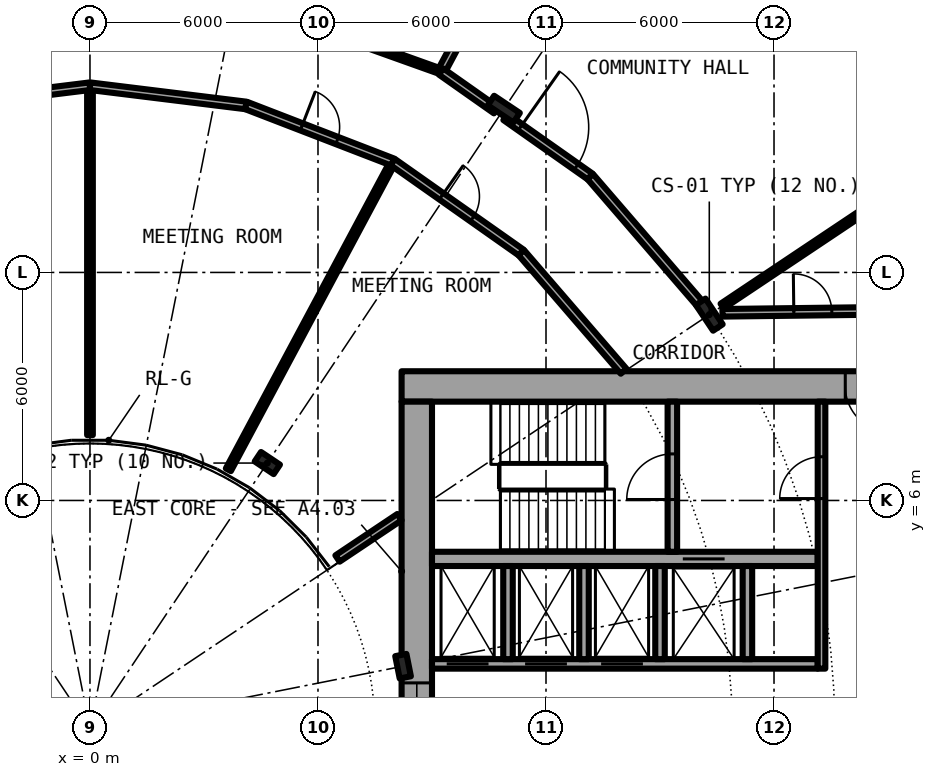
"""IFC4 building model, lengths in metres.
Left out: names, types, materials, properties, quantities, classifications, styles, units other than length and angle.
Written with IfcOpenShell. Run it as: python <this file> out.ifc"""

import sys

from ifc_helpers import new_model, si_unit, direction, frame, frame_2d, origin, origin_2d, place, context, subcontext, project, spatial, rectangle, i_section, extrude, element, fill, save


model = new_model("IFC4")
c1 = context("Model", 3, precision=1e-05, world=origin(), true_north=direction((0.0, 1.0)))
c2 = subcontext(c1, "Body", "Model", "MODEL_VIEW")
j1 = project(units=[si_unit("LENGTHUNIT", "METRE"), si_unit("PLANEANGLEUNIT", "RADIAN")], contexts=[c1])
p1 = place(None, origin())
s1 = spatial("IfcSite", under=j1, at=p1, CompositionType="ELEMENT")
p2 = place(p1, origin())
s2 = spatial("IfcBuilding", under=s1, at=p2, CompositionType="ELEMENT")
p3 = place(p2, frame((0.0, 0.0, 9.6)))
s3 = spatial("IfcBuildingStorey", under=s2, at=p3, CompositionType="ELEMENT", Elevation=9.6)
for number, where, z_axis, x_axis in (
    (1, (16.297, 10.889, 0.0), (0.0, 0.0, 1.0), (0.831, 0.556, 0.0)),
    (2, (10.889, 16.297, 0.0), (0.0, 0.0, 1.0), (0.556, 0.831, 0.0)),
):
    element("IfcColumn", number, at=place(p3, frame(where, z_axis=z_axis, x_axis=x_axis)), inside=s3, PredefinedType="COLUMN", context=c2, shape_type="SweptSolid", body=[
        extrude(i_section(OverallWidth=0.303, OverallDepth=0.814, WebThickness=0.021, FlangeThickness=0.04, FilletRadius=0.03, at=origin_2d()), origin(), (0.0, 0.0, 1.0), 4.5),
    ])
for number, where, z_axis, x_axis in (
    (3, (8.239, 1.639, 0.0), (0.0, 0.0, 1.0), (0.981, 0.195, 0.0)),
    (4, (4.667, 6.984, 0.0), (0.0, 0.0, 1.0), (0.556, 0.831, 0.0)),
):
    element("IfcColumn", number, at=place(p3, frame(where, z_axis=z_axis, x_axis=x_axis)), inside=s3, PredefinedType="COLUMN", context=c2, shape_type="SweptSolid", body=[
        extrude(i_section(OverallWidth=0.3, OverallDepth=0.6, WebThickness=0.015, FlangeThickness=0.03, FilletRadius=0.027, at=origin_2d()), origin(), (0.0, 0.0, 1.0), 4.5),
    ])
p4 = place(p3, frame((22.4, 9.0, 0.0), z_axis=(0.0, 0.0, 1.0), x_axis=(-1.0, 0.0, 0.0)))
e5 = element("IfcWall", 5, at=p4, inside=s3, PredefinedType="SHEAR", context=c2, shape_type="SweptSolid", body=[
    extrude(rectangle(XDim=14.2, YDim=0.8, at=frame_2d((7.1, 0.0))), origin(), (0.0, 0.0, 1.0), 4.5),
])
p5 = place(p4, frame((1.325, 0.0, 0.0)))
e6 = element("IfcOpeningElement", 6, at=p5, cuts=e5, PredefinedType="OPENING", context=c2, shape_type="SweptSolid", body=[
    extrude(rectangle(XDim=1.2, YDim=2.3, at=frame_2d((0.6, 1.15))), frame((0.0, 0.41, 0.0), z_axis=(0.0, -1.0, 0.0), x_axis=(1.0, 0.0, 0.0)), (0.0, 0.0, 1.0), 0.82),
])
p6 = place(p3, frame((8.6, -8.6, 0.0), z_axis=(0.0, 0.0, 1.0), x_axis=(0.0, 1.0, 0.0)))
e7 = element("IfcWall", 7, at=p6, inside=s3, PredefinedType="SHEAR", context=c2, shape_type="SweptSolid", body=[
    extrude(rectangle(XDim=17.2, YDim=0.8, at=frame_2d((8.6, 0.0))), origin(), (0.0, 0.0, 1.0), 4.5),
])
p7 = place(p6, frame((7.4, 0.0, 0.1)))
e8 = element("IfcOpeningElement", 8, at=p7, cuts=e7, PredefinedType="OPENING", context=c2, shape_type="SweptSolid", body=[
    extrude(rectangle(XDim=2.4, YDim=2.2, at=frame_2d((1.2, 1.1))), frame((0.0, 0.41, 0.0), z_axis=(0.0, -1.0, 0.0), x_axis=(1.0, 0.0, 0.0)), (0.0, 0.0, 1.0), 0.82),
])
p8 = place(p3, frame((9.0, 1.7, 0.0), z_axis=(0.0, 0.0, 1.0), x_axis=(1.0, 0.0, 0.0)))
e9 = element("IfcWall", 9, at=p8, inside=s3, PredefinedType="SHEAR", context=c2, shape_type="SweptSolid", body=[
    extrude(rectangle(XDim=10.15, YDim=0.25, at=frame_2d((5.075, 0.0))), origin(), (0.0, 0.0, 1.0), 4.5),
])
p9 = place(p8, frame((0.387, 0.0, 0.0)))
e10 = element("IfcOpeningElement", 10, at=p9, cuts=e9, PredefinedType="OPENING", context=c2, shape_type="SweptSolid", body=[
    extrude(rectangle(XDim=1.1, YDim=2.3, at=frame_2d((0.55, 1.15))), frame((0.0, 0.135, 0.0), z_axis=(0.0, -1.0, 0.0), x_axis=(1.0, 0.0, 0.0)), (0.0, 0.0, 1.0), 0.27),
])
p10 = place(p8, frame((2.45, 0.0, 0.0)))
e11 = element("IfcOpeningElement", 11, at=p10, cuts=e9, PredefinedType="OPENING", context=c2, shape_type="SweptSolid", body=[
    extrude(rectangle(XDim=1.1, YDim=2.3, at=frame_2d((0.55, 1.15))), frame((0.0, 0.135, 0.0), z_axis=(0.0, -1.0, 0.0), x_axis=(1.0, 0.0, 0.0)), (0.0, 0.0, 1.0), 0.27),
])
p11 = place(p8, frame((4.45, 0.0, 0.0)))
e12 = element("IfcOpeningElement", 12, at=p11, cuts=e9, PredefinedType="OPENING", context=c2, shape_type="SweptSolid", body=[
    extrude(rectangle(XDim=1.1, YDim=2.3, at=frame_2d((0.55, 1.15))), frame((0.0, 0.135, 0.0), z_axis=(0.0, -1.0, 0.0), x_axis=(1.0, 0.0, 0.0)), (0.0, 0.0, 1.0), 0.27),
])
p12 = place(p3, frame((9.0, 4.462, 0.0), z_axis=(0.0, 0.0, 1.0), x_axis=(1.0, 0.0, 0.0)))
e13 = element("IfcWall", 13, at=p12, inside=s3, PredefinedType="SHEAR", context=c2, shape_type="SweptSolid", body=[
    extrude(rectangle(XDim=10.15, YDim=0.375, at=frame_2d((5.075, 0.0))), origin(), (0.0, 0.0, 1.0), 4.5),
])
p13 = place(p12, frame((6.6, 0.0, 0.0)))
e14 = element("IfcOpeningElement", 14, at=p13, cuts=e13, PredefinedType="OPENING", context=c2, shape_type="SweptSolid", body=[
    extrude(rectangle(XDim=1.1, YDim=2.3, at=frame_2d((0.55, 1.15))), frame((0.0, 0.198, 0.0), z_axis=(0.0, -1.0, 0.0), x_axis=(1.0, 0.0, 0.0)), (0.0, 0.0, 1.0), 0.395),
])
p14 = place(p3, frame((15.325, 4.65, 0.0), z_axis=(0.0, 0.0, 1.0), x_axis=(0.0, 1.0, 0.0)))
e15 = element("IfcWall", 15, at=p14, inside=s3, PredefinedType="SHEAR", context=c2, shape_type="SweptSolid", body=[
    extrude(rectangle(XDim=3.95, YDim=0.25, at=frame_2d((1.975, 0.0))), origin(), (0.0, 0.0, 1.0), 4.5),
])
p15 = place(p14, frame((1.375, 0.0, 0.0)))
e16 = element("IfcOpeningElement", 16, at=p15, cuts=e15, PredefinedType="OPENING", context=c2, shape_type="SweptSolid", body=[
    extrude(rectangle(XDim=1.2, YDim=2.3, at=frame_2d((0.6, 1.15))), frame((0.0, 0.135, 0.0), z_axis=(0.0, -1.0, 0.0), x_axis=(1.0, 0.0, 0.0)), (0.0, 0.0, 1.0), 0.27),
])
for number, where, z_axis, x_axis in (
    (17, (15.0, 1.825, 0.0), (0.0, 0.0, 1.0), (0.0, 1.0, 0.0)),
    (18, (17.3, 1.825, 0.0), (0.0, 0.0, 1.0), (0.0, 1.0, 0.0)),
):
    element("IfcWall", number, at=place(p3, frame(where, z_axis=z_axis, x_axis=x_axis)), inside=s3, PredefinedType="SOLIDWALL", context=c2, shape_type="SweptSolid", body=[
        extrude(rectangle(XDim=2.45, YDim=0.25, at=frame_2d((1.225, 0.0))), origin(), (0.0, 0.0, 1.0), 4.05),
    ])
p16 = place(p3, frame((19.25, 1.575, 0.0), z_axis=(0.0, 0.0, 1.0), x_axis=(0.0, 1.0, 0.0)))
e19 = element("IfcWall", 19, at=p16, inside=s3, PredefinedType="SOLIDWALL", context=c2, shape_type="SweptSolid", body=[
    extrude(rectangle(XDim=7.025, YDim=0.2, at=frame_2d((3.513, 0.0))), origin(), (0.0, 0.0, 1.0), 4.05),
])
p17 = place(p16, frame((4.475, 0.0, 0.0)))
e20 = element("IfcOpeningElement", 20, at=p17, cuts=e19, PredefinedType="OPENING", context=c2, shape_type="SweptSolid", body=[
    extrude(rectangle(XDim=1.1, YDim=2.3, at=frame_2d((0.55, 1.15))), frame((0.0, 0.11, 0.0), z_axis=(0.0, -1.0, 0.0), x_axis=(1.0, 0.0, 0.0)), (0.0, 0.0, 1.0), 0.22),
])
for number, where, z_axis, x_axis in (
    (21, (11.0, 1.825, 0.0), (0.0, 0.0, 1.0), (0.0, 1.0, 0.0)),
    (22, (13.0, 1.825, 0.0), (0.0, 0.0, 1.0), (0.0, 1.0, 0.0)),
):
    element("IfcWall", number, at=place(p3, frame(where, z_axis=z_axis, x_axis=x_axis)), inside=s3, PredefinedType="SOLIDWALL", context=c2, shape_type="SweptSolid", body=[
        extrude(rectangle(XDim=2.45, YDim=0.25, at=frame_2d((1.225, 0.0))), origin(), (0.0, 0.0, 1.0), 4.05),
    ])
p18 = place(p3, frame((0.0, 7.72, 0.0), z_axis=(0.0, 0.0, 1.0), x_axis=(0.0, 1.0, 0.0)))
e23 = element("IfcWall", 23, at=p18, inside=s3, PredefinedType="PARTITIONING", context=c2, shape_type="SweptSolid", body=[
    extrude(rectangle(XDim=9.18, YDim=0.15, at=frame_2d((4.59, 0.0))), origin(), (0.0, 0.0, 1.0), 4.05),
])
p19 = place(p3, frame((3.641, 6.807, 0.0), z_axis=(0.0, 0.0, 1.0), x_axis=(0.471428625665, 0.881904218667, 0.0)))
e24 = element("IfcWall", 24, at=p19, inside=s3, PredefinedType="PARTITIONING", context=c2, shape_type="SweptSolid", body=[
    extrude(rectangle(XDim=9.18, YDim=0.15, at=frame_2d((4.59, 0.0))), origin(), (0.0, 0.0, 1.0), 4.05),
])
p20 = place(p3, frame((9.242, 17.285, 0.0), z_axis=(0.0, 0.0, 1.0), x_axis=(0.471597030656, 0.88181417582, 0.0)))
e25 = element("IfcWall", 25, at=p20, inside=s3, PredefinedType="PARTITIONING", context=c2, shape_type="SweptSolid", body=[
    extrude(rectangle(XDim=2.398, YDim=0.2, at=frame_2d((1.199, 0.0))), origin(), (0.0, 0.0, 1.0), 4.05),
])
p21 = place(p3, frame((16.635, 11.115, 0.0), z_axis=(0.0, 0.0, 1.0), x_axis=(0.831431488123, 0.555627285648, 0.0)))
e26 = element("IfcWall", 26, at=p21, inside=s3, PredefinedType="PARTITIONING", context=c2, shape_type="SweptSolid", body=[
    extrude(rectangle(XDim=7.168, YDim=0.15, at=frame_2d((3.584, 0.0))), origin(), (0.0, 0.0, 1.0), 4.05),
])
p22 = place(p3, frame((6.513, 4.472, 0.0), z_axis=(0.0, 0.0, 1.0), x_axis=(0.831417956244, 0.555647533996, 0.0)))
e27 = element("IfcWall", 27, at=p22, inside=s3, PredefinedType="PARTITIONING", context=c2, shape_type="SweptSolid", body=[
    extrude(rectangle(XDim=1.962, YDim=0.2, at=frame_2d((0.981, 0.0))), origin(), (0.0, 0.0, 1.0), 4.05),
])
p23 = place(p3, frame((16.643, 10.938, 0.0), z_axis=(0.0, 0.0, 1.0), x_axis=(0.999924074118, 0.012322580895, 0.0)))
e28 = element("IfcWall", 28, at=p23, inside=s3, PredefinedType="PARTITIONING", context=c2, shape_type="SweptSolid", body=[
    extrude(rectangle(XDim=5.032, YDim=0.2, at=frame_2d((2.516, 0.0))), origin(), (0.0, 0.0, 1.0), 4.05),
])
p24 = place(p23, frame((1.878, 0.0, 0.0)))
e29 = element("IfcOpeningElement", 29, at=p24, cuts=e28, PredefinedType="OPENING", context=c2, shape_type="SweptSolid", body=[
    extrude(rectangle(XDim=1.0, YDim=2.3, at=frame_2d((0.5, 1.15))), frame((0.0, 0.11, 0.0), z_axis=(0.0, -1.0, 0.0), x_axis=(1.0, 0.0, 0.0)), (0.0, 0.0, 1.0), 0.22),
])
for number, where, z_axis, x_axis in (
    (30, (-4.106, 16.394, 0.0), (0.0, 0.0, 1.0), (0.992, 0.122, 0.0)),
    (31, (0.0, 16.9, 0.0), (0.0, 0.0, 1.0), (0.992, -0.122, 0.0)),
):
    element("IfcWall", number, at=place(p3, frame(where, z_axis=z_axis, x_axis=x_axis)), inside=s3, PredefinedType="PARTITIONING", context=c2, shape_type="SweptSolid", body=[
        extrude(rectangle(XDim=4.137, YDim=0.2, at=frame_2d((2.068, 0.0))), origin(), (0.0, 0.0, 1.0), 4.05),
    ])
p25 = place(p3, frame((4.106, 16.394, 0.0), z_axis=(0.0, 0.0, 1.0), x_axis=(0.932943640288, -0.360022449363, 0.0)))
e32 = element("IfcWall", 32, at=p25, inside=s3, PredefinedType="PARTITIONING", context=c2, shape_type="SweptSolid", body=[
    extrude(rectangle(XDim=4.139, YDim=0.2, at=frame_2d((2.069, 0.0))), origin(), (0.0, 0.0, 1.0), 4.05),
])
p26 = place(p25, frame((1.569, 0.0, 0.0)))
e33 = element("IfcOpeningElement", 33, at=p26, cuts=e32, PredefinedType="OPENING", context=c2, shape_type="SweptSolid", body=[
    extrude(rectangle(XDim=1.0, YDim=2.3, at=frame_2d((0.5, 1.15))), frame((0.0, 0.11, 0.0), z_axis=(0.0, -1.0, 0.0), x_axis=(1.0, 0.0, 0.0)), (0.0, 0.0, 1.0), 0.22),
])
p27 = place(p3, frame((7.967, 14.904, 0.0), z_axis=(0.0, 0.0, 1.0), x_axis=(0.817567680547, -0.575832517079, 0.0)))
e34 = element("IfcWall", 34, at=p27, inside=s3, PredefinedType="PARTITIONING", context=c2, shape_type="SweptSolid", body=[
    extrude(rectangle(XDim=4.137, YDim=0.2, at=frame_2d((2.068, 0.0))), origin(), (0.0, 0.0, 1.0), 4.05),
])
p28 = place(p27, frame((1.568, 0.0, 0.0)))
e35 = element("IfcOpeningElement", 35, at=p28, cuts=e34, PredefinedType="OPENING", context=c2, shape_type="SweptSolid", body=[
    extrude(rectangle(XDim=1.0, YDim=2.3, at=frame_2d((0.5, 1.15))), frame((0.0, 0.11, 0.0), z_axis=(0.0, -1.0, 0.0), x_axis=(1.0, 0.0, 0.0)), (0.0, 0.0, 1.0), 0.22),
])
p29 = place(p3, frame((11.349, 12.522, 0.0), z_axis=(0.0, 0.0, 1.0), x_axis=(0.653274518104, -0.757121129012, 0.0)))
e36 = element("IfcWall", 36, at=p29, inside=s3, PredefinedType="PARTITIONING", context=c2, shape_type="SweptSolid", body=[
    extrude(rectangle(XDim=4.124, YDim=0.2, at=frame_2d((2.062, 0.0))), origin(), (0.0, 0.0, 1.0), 4.05),
])
p30 = place(p3, frame((3.968, 19.172, 0.0), z_axis=(0.0, 0.0, 1.0), x_axis=(0.941530584678, -0.336927526504, 0.0)))
e37 = element("IfcWall", 37, at=p30, inside=s3, PredefinedType="PARTITIONING", context=c2, shape_type="SweptSolid", body=[
    extrude(rectangle(XDim=5.598, YDim=0.15, at=frame_2d((2.799, 0.0))), origin(), (0.0, 0.0, 1.0), 3.63),
])
p31 = place(p30, frame((2.223, 0.0, 0.0)))
e38 = element("IfcOpeningElement", 38, at=p31, cuts=e37, PredefinedType="OPENING", context=c2, shape_type="SweptSolid", body=[
    extrude(rectangle(XDim=1.0, YDim=2.3, at=frame_2d((0.5, 1.15))), frame((0.0, 0.085, 0.0), z_axis=(0.0, -1.0, 0.0), x_axis=(1.0, 0.0, 0.0)), (0.0, 0.0, 1.0), 0.17),
])
p32 = place(p3, frame((9.239, 17.286, 0.0), z_axis=(0.0, 0.0, 1.0), x_axis=(0.817849682833, -0.575431921508, 0.0)))
e39 = element("IfcWall", 39, at=p32, inside=s3, PredefinedType="PARTITIONING", context=c2, shape_type="SweptSolid", body=[
    extrude(rectangle(XDim=1.771, YDim=0.2, at=frame_2d((0.885, 0.0))), origin(), (0.0, 0.0, 1.0), 3.63),
])
p33 = place(p3, frame((10.935, 16.092, 0.0), z_axis=(0.0, 0.0, 1.0), x_axis=(0.817595540973, -0.575792958781, 0.0)))
e40 = element("IfcWall", 40, at=p33, inside=s3, PredefinedType="PARTITIONING", context=c2, shape_type="SweptSolid", body=[
    extrude(rectangle(XDim=2.725, YDim=0.2, at=frame_2d((1.363, 0.0))), origin(), (0.0, 0.0, 1.0), 3.63),
])
p34 = place(p33, frame((0.476, 0.0, 0.0)))
e41 = element("IfcOpeningElement", 41, at=p34, cuts=e40, PredefinedType="OPENING", context=c2, shape_type="SweptSolid", body=[
    extrude(rectangle(XDim=1.8, YDim=2.3, at=frame_2d((0.9, 1.15))), frame((0.0, 0.11, 0.0), z_axis=(0.0, -1.0, 0.0), x_axis=(1.0, 0.0, 0.0)), (0.0, 0.0, 1.0), 0.22),
])
p35 = place(p3, frame((13.163, 14.523, 0.0), z_axis=(0.0, 0.0, 1.0), x_axis=(0.653077876854, -0.757290754443, 0.0)))
e42 = element("IfcWall", 42, at=p35, inside=s3, PredefinedType="PARTITIONING", context=c2, shape_type="SweptSolid", body=[
    extrude(rectangle(XDim=4.646, YDim=0.2, at=frame_2d((2.323, 0.0))), origin(), (0.0, 0.0, 1.0), 3.63),
])
p36 = place(p9, origin())
e43 = element("IfcDoor", 43, at=p36, inside=s3, OperationType="DOUBLE_DOOR_SLIDING", PredefinedType="DOOR", context=c2, shape_type="SweptSolid", body=[
    extrude(rectangle(XDim=1.1, YDim=2.3, at=frame_2d((0.55, 1.15))), frame((0.0, 0.025, 0.0), z_axis=(0.0, -1.0, 0.0), x_axis=(1.0, 0.0, 0.0)), (0.0, 0.0, 1.0), 0.05),
])
fill(e10, e43)
p37 = place(p10, origin())
e44 = element("IfcDoor", 44, at=p37, inside=s3, OperationType="DOUBLE_DOOR_SLIDING", PredefinedType="DOOR", context=c2, shape_type="SweptSolid", body=[
    extrude(rectangle(XDim=1.1, YDim=2.3, at=frame_2d((0.55, 1.15))), frame((0.0, 0.025, 0.0), z_axis=(0.0, -1.0, 0.0), x_axis=(1.0, 0.0, 0.0)), (0.0, 0.0, 1.0), 0.05),
])
fill(e11, e44)
p38 = place(p11, origin())
e45 = element("IfcDoor", 45, at=p38, inside=s3, OperationType="DOUBLE_DOOR_SLIDING", PredefinedType="DOOR", context=c2, shape_type="SweptSolid", body=[
    extrude(rectangle(XDim=1.1, YDim=2.3, at=frame_2d((0.55, 1.15))), frame((0.0, 0.025, 0.0), z_axis=(0.0, -1.0, 0.0), x_axis=(1.0, 0.0, 0.0)), (0.0, 0.0, 1.0), 0.05),
])
fill(e12, e45)
p39 = place(p13, origin())
e46 = element("IfcDoor", 46, at=p39, inside=s3, OperationType="DOUBLE_DOOR_SLIDING", PredefinedType="DOOR", context=c2, shape_type="SweptSolid", body=[
    extrude(rectangle(XDim=1.1, YDim=2.3, at=frame_2d((0.55, 1.15))), frame((0.0, 0.025, 0.0), z_axis=(0.0, -1.0, 0.0), x_axis=(1.0, 0.0, 0.0)), (0.0, 0.0, 1.0), 0.05),
])
fill(e14, e46)
p40 = place(p15, origin())
e47 = element("IfcDoor", 47, at=p40, inside=s3, OperationType="SINGLE_SWING_LEFT", PredefinedType="DOOR", context=c2, shape_type="SweptSolid", body=[
    extrude(rectangle(XDim=1.2, YDim=2.3, at=frame_2d((0.6, 1.15))), frame((0.0, 0.025, 0.0), z_axis=(0.0, -1.0, 0.0), x_axis=(1.0, 0.0, 0.0)), (0.0, 0.0, 1.0), 0.05),
])
fill(e16, e47)
p41 = place(p17, origin())
e48 = element("IfcDoor", 48, at=p41, inside=s3, OperationType="SINGLE_SWING_LEFT", PredefinedType="DOOR", context=c2, shape_type="SweptSolid", body=[
    extrude(rectangle(XDim=1.1, YDim=2.3, at=frame_2d((0.55, 1.15))), frame((0.0, 0.025, 0.0), z_axis=(0.0, -1.0, 0.0), x_axis=(1.0, 0.0, 0.0)), (0.0, 0.0, 1.0), 0.05),
])
fill(e20, e48)
p42 = place(p5, origin())
e49 = element("IfcDoor", 49, at=p42, inside=s3, OperationType="SINGLE_SWING_RIGHT", PredefinedType="DOOR", context=c2, shape_type="SweptSolid", body=[
    extrude(rectangle(XDim=1.2, YDim=2.3, at=frame_2d((0.6, 1.15))), frame((0.0, 0.025, 0.0), z_axis=(0.0, -1.0, 0.0), x_axis=(1.0, 0.0, 0.0)), (0.0, 0.0, 1.0), 0.05),
])
fill(e6, e49)
p43 = place(p7, origin())
e50 = element("IfcWindow", 50, at=p43, inside=s3, PartitioningType="SINGLE_PANEL", PredefinedType="WINDOW", context=c2, shape_type="SweptSolid", body=[
    extrude(rectangle(XDim=2.4, YDim=2.2, at=frame_2d((1.2, 1.1))), frame((0.0, 0.03, 0.0), z_axis=(0.0, -1.0, 0.0), x_axis=(1.0, 0.0, 0.0)), (0.0, 0.0, 1.0), 0.06),
])
fill(e8, e50)
p44 = place(p34, origin())
e51 = element("IfcDoor", 51, at=p44, inside=s3, OperationType="DOUBLE_DOOR_SINGLE_SWING", PredefinedType="DOOR", context=c2, shape_type="SweptSolid", body=[
    extrude(rectangle(XDim=1.8, YDim=2.3, at=frame_2d((0.9, 1.15))), frame((0.0, 0.025, 0.0), z_axis=(0.0, -1.0, 0.0), x_axis=(1.0, 0.0, 0.0)), (0.0, 0.0, 1.0), 0.05),
])
fill(e41, e51)
p45 = place(p28, origin())
e52 = element("IfcDoor", 52, at=p45, inside=s3, OperationType="SINGLE_SWING_LEFT", PredefinedType="DOOR", context=c2, shape_type="SweptSolid", body=[
    extrude(rectangle(XDim=1.0, YDim=2.3, at=frame_2d((0.5, 1.15))), frame((0.0, 0.025, 0.0), z_axis=(0.0, -1.0, 0.0), x_axis=(1.0, 0.0, 0.0)), (0.0, 0.0, 1.0), 0.05),
])
fill(e35, e52)
p46 = place(p26, origin())
e53 = element("IfcDoor", 53, at=p46, inside=s3, OperationType="SINGLE_SWING_LEFT", PredefinedType="DOOR", context=c2, shape_type="SweptSolid", body=[
    extrude(rectangle(XDim=1.0, YDim=2.3, at=frame_2d((0.5, 1.15))), frame((0.0, 0.025, 0.0), z_axis=(0.0, -1.0, 0.0), x_axis=(1.0, 0.0, 0.0)), (0.0, 0.0, 1.0), 0.05),
])
fill(e33, e53)
p47 = place(p24, origin())
e54 = element("IfcDoor", 54, at=p47, inside=s3, OperationType="SINGLE_SWING_LEFT", PredefinedType="DOOR", context=c2, shape_type="SweptSolid", body=[
    extrude(rectangle(XDim=1.0, YDim=2.3, at=frame_2d((0.5, 1.15))), frame((0.0, 0.025, 0.0), z_axis=(0.0, -1.0, 0.0), x_axis=(1.0, 0.0, 0.0)), (0.0, 0.0, 1.0), 0.05),
])
fill(e29, e54)
save(model, sys.argv[1])
